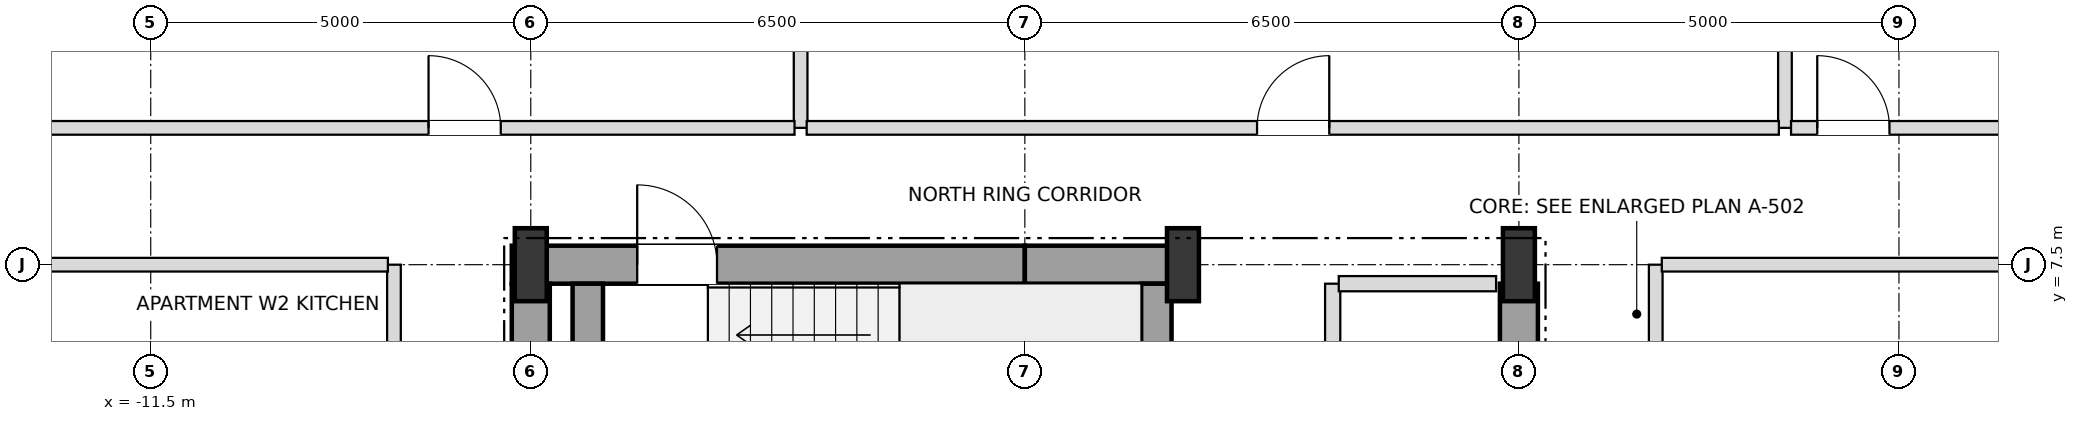
"""IFC4 building model, lengths in metres.
Left out: names, types, materials, properties, quantities, classifications, styles, units other than length and angle.
Written with IfcOpenShell. Run it as: python <this file> out.ifc"""

import sys

from ifc_helpers import new_model, si_unit, direction, frame, frame_2d, origin, origin_2d, place, context, subcontext, project, spatial, rectangle, i_section, extrude, element, fill, save


model = new_model("IFC4")
c1 = context("Model", 3, precision=1e-05, world=origin(), true_north=direction((0.0, 1.0)))
c2 = subcontext(c1, "Body", "Model", "MODEL_VIEW")
j1 = project(units=[si_unit("LENGTHUNIT", "METRE"), si_unit("PLANEANGLEUNIT", "RADIAN")], contexts=[c1])
p1 = place(None, origin())
s1 = spatial("IfcSite", under=j1, at=p1, CompositionType="ELEMENT")
p2 = place(p1, origin())
s2 = spatial("IfcBuilding", under=s1, at=p2, CompositionType="ELEMENT")
p3 = place(p2, frame((0.0, 0.0, 50.4)))
s3 = spatial("IfcBuildingStorey", under=s2, at=p3, CompositionType="ELEMENT", Elevation=50.4)
for number, where, z_axis, x_axis in (
    (1, (-6.5, 7.5, 0.0), (0.0, 0.0, 1.0), (1.0, 0.0, 0.0)),
    (2, (2.08, 7.5, 0.0), (0.0, 0.0, 1.0), (1.0, 0.0, 0.0)),
    (3, (6.5, 7.5, 0.0), (0.0, 0.0, 1.0), (1.0, 0.0, 0.0)),
):
    element("IfcColumn", number, at=place(p3, frame(where, z_axis=z_axis, x_axis=x_axis)), inside=s3, PredefinedType="COLUMN", context=c2, shape_type="SweptSolid", body=[
        extrude(i_section(OverallWidth=0.42, OverallDepth=0.96, WebThickness=0.022, FlangeThickness=0.034, at=origin_2d()), origin(), (0.0, 0.0, 1.0), 3.6),
    ])
p4 = place(p3, frame((-6.75, 7.5, 0.0), z_axis=(0.0, 0.0, 1.0), x_axis=(1.0, 0.0, 0.0)))
e4 = element("IfcWall", 4, at=p4, inside=s3, PredefinedType="SHEAR", context=c2, shape_type="SweptSolid", body=[
    extrude(rectangle(XDim=6.75, YDim=0.5, at=frame_2d((3.375, 0.0))), origin(), (0.0, 0.0, 1.0), 3.38),
])
p5 = place(p4, frame((1.65, 0.0, 0.0)))
e5 = element("IfcOpeningElement", 5, at=p5, cuts=e4, PredefinedType="OPENING", context=c2, shape_type="SweptSolid", body=[
    extrude(rectangle(XDim=1.05, YDim=2.15, at=frame_2d((0.525, 1.075))), frame((0.0, 0.26, 0.0), z_axis=(0.0, -1.0, 0.0), x_axis=(1.0, 0.0, 0.0)), (0.0, 0.0, 1.0), 0.52),
])
p6 = place(p3, frame((0.0, 7.5, 0.0), z_axis=(0.0, 0.0, 1.0), x_axis=(1.0, 0.0, 0.0)))
e6 = element("IfcWall", 6, at=p6, inside=s3, PredefinedType="SHEAR", context=c2, shape_type="SweptSolid", body=[
    extrude(rectangle(XDim=2.08, YDim=0.5, at=frame_2d((1.04, 0.0))), origin(), (0.0, 0.0, 1.0), 3.38),
])
for number, where, z_axis, x_axis in (
    (7, (-6.5, 3.95, 0.0), (0.0, 0.0, 1.0), (0.0, 1.0, 0.0)),
    (8, (6.5, 3.95, 0.0), (0.0, 0.0, 1.0), (0.0, 1.0, 0.0)),
):
    element("IfcWall", number, at=place(p3, frame(where, z_axis=z_axis, x_axis=x_axis)), inside=s3, PredefinedType="SHEAR", context=c2, shape_type="SweptSolid", body=[
        extrude(rectangle(XDim=3.3, YDim=0.5, at=frame_2d((1.65, 0.0))), origin(), (0.0, 0.0, 1.0), 3.38),
    ])
for number, where, z_axis, x_axis in (
    (9, (1.73, 3.95, 0.0), (0.0, 0.0, 1.0), (0.0, 1.0, 0.0)),
    (10, (-5.75, 3.95, 0.0), (0.0, 0.0, 1.0), (0.0, 1.0, 0.0)),
):
    element("IfcWall", number, at=place(p3, frame(where, z_axis=z_axis, x_axis=x_axis)), inside=s3, PredefinedType="SHEAR", context=c2, shape_type="SweptSolid", body=[
        extrude(rectangle(XDim=3.3, YDim=0.4, at=frame_2d((1.65, 0.0))), origin(), (0.0, 0.0, 1.0), 3.38),
    ])
p7 = place(p3, frame((-8.3, -7.5, 0.0), z_axis=(0.0, 0.0, 1.0), x_axis=(0.0, 1.0, 0.0)))
e11 = element("IfcWall", 11, at=p7, inside=s3, PredefinedType="PARTITIONING", context=c2, shape_type="SweptSolid", body=[
    extrude(rectangle(XDim=15.0, YDim=0.18, at=frame_2d((7.5, 0.0))), origin(), (0.0, 0.0, 1.0), 3.38),
])
p8 = place(p7, frame((3.565, 0.0, 0.0)))
e12 = element("IfcOpeningElement", 12, at=p8, cuts=e11, PredefinedType="OPENING", context=c2, shape_type="SweptSolid", body=[
    extrude(rectangle(XDim=0.95, YDim=2.15, at=frame_2d((0.475, 1.075))), frame((0.0, 0.1, 0.0), z_axis=(0.0, -1.0, 0.0), x_axis=(1.0, 0.0, 0.0)), (0.0, 0.0, 1.0), 0.2),
])
p9 = place(p7, frame((11.145, 0.0, 0.0)))
e13 = element("IfcOpeningElement", 13, at=p9, cuts=e11, PredefinedType="OPENING", context=c2, shape_type="SweptSolid", body=[
    extrude(rectangle(XDim=0.95, YDim=2.15, at=frame_2d((0.475, 1.075))), frame((0.0, 0.1, 0.0), z_axis=(0.0, -1.0, 0.0), x_axis=(1.0, 0.0, 0.0)), (0.0, 0.0, 1.0), 0.2),
])
p10 = place(p3, frame((-2.95, 9.3, 0.0), z_axis=(0.0, 0.0, 1.0), x_axis=(0.0, 1.0, 0.0)))
e14 = element("IfcWall", 14, at=p10, inside=s3, PredefinedType="PARTITIONING", context=c2, shape_type="SweptSolid", body=[
    extrude(rectangle(XDim=15.6, YDim=0.18, at=frame_2d((7.8, 0.0))), origin(), (0.0, 0.0, 1.0), 2.816),
])
p11 = place(p3, frame((4.05, 4.2, 0.0), z_axis=(0.0, 0.0, 1.0), x_axis=(0.0, 1.0, 0.0)))
e15 = element("IfcWall", 15, at=p11, inside=s3, PredefinedType="SOLIDWALL", context=c2, shape_type="SweptSolid", body=[
    extrude(rectangle(XDim=3.05, YDim=0.2, at=frame_2d((1.525, 0.0))), origin(), (0.0, 0.0, 1.0), 3.38),
])
p12 = place(p11, frame((0.975, 0.0, 0.0)))
e16 = element("IfcOpeningElement", 16, at=p12, cuts=e15, PredefinedType="OPENING", context=c2, shape_type="SweptSolid", body=[
    extrude(rectangle(XDim=0.95, YDim=2.15, at=frame_2d((0.475, 1.075))), frame((0.0, 0.11, 0.0), z_axis=(0.0, -1.0, 0.0), x_axis=(1.0, 0.0, 0.0)), (0.0, 0.0, 1.0), 0.22),
])
p13 = place(p3, frame((8.3, -7.5, 0.0), z_axis=(0.0, 0.0, 1.0), x_axis=(0.0, 1.0, 0.0)))
e17 = element("IfcWall", 17, at=p13, inside=s3, PredefinedType="PARTITIONING", context=c2, shape_type="SweptSolid", body=[
    extrude(rectangle(XDim=15.0, YDim=0.18, at=frame_2d((7.5, 0.0))), origin(), (0.0, 0.0, 1.0), 3.38),
])
p14 = place(p13, frame((3.475, 0.0, 0.0)))
e18 = element("IfcOpeningElement", 18, at=p14, cuts=e17, PredefinedType="OPENING", context=c2, shape_type="SweptSolid", body=[
    extrude(rectangle(XDim=0.95, YDim=2.15, at=frame_2d((0.475, 1.075))), frame((0.0, 0.1, 0.0), z_axis=(0.0, -1.0, 0.0), x_axis=(1.0, 0.0, 0.0)), (0.0, 0.0, 1.0), 0.2),
])
p15 = place(p3, frame((10.0, 9.3, 0.0), z_axis=(0.0, 0.0, 1.0), x_axis=(0.0, 1.0, 0.0)))
e19 = element("IfcWall", 19, at=p15, inside=s3, PredefinedType="PARTITIONING", context=c2, shape_type="SweptSolid", body=[
    extrude(rectangle(XDim=15.6, YDim=0.18, at=frame_2d((7.8, 0.0))), origin(), (0.0, 0.0, 1.0), 2.816),
])
p16 = place(p15, frame((8.635, 0.0, 0.0)))
e20 = element("IfcOpeningElement", 20, at=p16, cuts=e19, PredefinedType="OPENING", context=c2, shape_type="SweptSolid", body=[
    extrude(rectangle(XDim=0.95, YDim=2.15, at=frame_2d((0.475, 1.075))), frame((0.0, 0.1, 0.0), z_axis=(0.0, -1.0, 0.0), x_axis=(1.0, 0.0, 0.0)), (0.0, 0.0, 1.0), 0.2),
])
p17 = place(p3, frame((4.13, 7.25, 0.0), z_axis=(0.0, 0.0, 1.0), x_axis=(1.0, 0.0, 0.0)))
e21 = element("IfcWall", 21, at=p17, inside=s3, PredefinedType="SOLIDWALL", context=c2, shape_type="SweptSolid", body=[
    extrude(rectangle(XDim=2.07, YDim=0.2, at=frame_2d((1.035, 0.0))), origin(), (0.0, 0.0, 1.0), 3.38),
])
for number, where, z_axis, x_axis in (
    (22, (-16.02, 7.5, 0.0), (0.0, 0.0, 1.0), (1.0, 0.0, 0.0)),
    (23, (8.38, 7.5, 0.0), (0.0, 0.0, 1.0), (1.0, 0.0, 0.0)),
):
    element("IfcWall", number, at=place(p3, frame(where, z_axis=z_axis, x_axis=x_axis)), inside=s3, PredefinedType="PARTITIONING", context=c2, shape_type="SweptSolid", body=[
        extrude(rectangle(XDim=7.64, YDim=0.18, at=frame_2d((3.82, 0.0))), origin(), (0.0, 0.0, 1.0), 2.816),
    ])
p18 = place(p3, frame((-18.4, 9.3, 0.0), z_axis=(0.0, 0.0, 1.0), x_axis=(1.0, 0.0, 0.0)))
e24 = element("IfcWall", 24, at=p18, inside=s3, PredefinedType="PARTITIONING", context=c2, shape_type="SweptSolid", body=[
    extrude(rectangle(XDim=15.37, YDim=0.18, at=frame_2d((7.685, 0.0))), origin(), (0.0, 0.0, 1.0), 2.816),
])
p19 = place(p18, frame((10.555, 0.0, 0.0)))
e25 = element("IfcOpeningElement", 25, at=p19, cuts=e24, PredefinedType="OPENING", context=c2, shape_type="SweptSolid", body=[
    extrude(rectangle(XDim=0.95, YDim=2.15, at=frame_2d((0.475, 1.075))), frame((0.0, 0.1, 0.0), z_axis=(0.0, -1.0, 0.0), x_axis=(1.0, 0.0, 0.0)), (0.0, 0.0, 1.0), 0.2),
])
p20 = place(p3, frame((-2.87, 9.3, 0.0), z_axis=(0.0, 0.0, 1.0), x_axis=(1.0, 0.0, 0.0)))
e26 = element("IfcWall", 26, at=p20, inside=s3, PredefinedType="PARTITIONING", context=c2, shape_type="SweptSolid", body=[
    extrude(rectangle(XDim=12.79, YDim=0.18, at=frame_2d((6.395, 0.0))), origin(), (0.0, 0.0, 1.0), 2.816),
])
p21 = place(p20, frame((5.925, 0.0, 0.0)))
e27 = element("IfcOpeningElement", 27, at=p21, cuts=e26, PredefinedType="OPENING", context=c2, shape_type="SweptSolid", body=[
    extrude(rectangle(XDim=0.95, YDim=2.15, at=frame_2d((0.475, 1.075))), frame((0.0, 0.1, 0.0), z_axis=(0.0, -1.0, 0.0), x_axis=(1.0, 0.0, 0.0)), (0.0, 0.0, 1.0), 0.2),
])
p22 = place(p3, frame((10.08, 9.3, 0.0), z_axis=(0.0, 0.0, 1.0), x_axis=(1.0, 0.0, 0.0)))
e28 = element("IfcWall", 28, at=p22, inside=s3, PredefinedType="PARTITIONING", context=c2, shape_type="SweptSolid", body=[
    extrude(rectangle(XDim=8.24, YDim=0.18, at=frame_2d((4.12, 0.0))), origin(), (0.0, 0.0, 1.0), 2.816),
])
p23 = place(p22, frame((0.345, 0.0, 0.0)))
e29 = element("IfcOpeningElement", 29, at=p23, cuts=e28, PredefinedType="OPENING", context=c2, shape_type="SweptSolid", body=[
    extrude(rectangle(XDim=0.95, YDim=2.15, at=frame_2d((0.475, 1.075))), frame((0.0, 0.1, 0.0), z_axis=(0.0, -1.0, 0.0), x_axis=(1.0, 0.0, 0.0)), (0.0, 0.0, 1.0), 0.2),
])
p24 = place(p5, origin())
e30 = element("IfcDoor", 30, at=p24, inside=s3, OperationType="SINGLE_SWING_LEFT", PredefinedType="DOOR", context=c2, shape_type="SweptSolid", body=[
    extrude(rectangle(XDim=1.05, YDim=2.15, at=frame_2d((0.525, 1.075))), frame((0.0, 0.025, 0.0), z_axis=(0.0, -1.0, 0.0), x_axis=(1.0, 0.0, 0.0)), (0.0, 0.0, 1.0), 0.05),
])
fill(e5, e30)
p25 = place(p23, origin())
e31 = element("IfcDoor", 31, at=p25, inside=s3, OperationType="SINGLE_SWING_LEFT", PredefinedType="DOOR", context=c2, shape_type="SweptSolid", body=[
    extrude(rectangle(XDim=0.95, YDim=2.15, at=frame_2d((0.475, 1.075))), frame((0.0, 0.025, 0.0), z_axis=(0.0, -1.0, 0.0), x_axis=(1.0, 0.0, 0.0)), (0.0, 0.0, 1.0), 0.05),
])
fill(e29, e31)
p26 = place(p19, origin())
e32 = element("IfcDoor", 32, at=p26, inside=s3, OperationType="SINGLE_SWING_LEFT", PredefinedType="DOOR", context=c2, shape_type="SweptSolid", body=[
    extrude(rectangle(XDim=0.95, YDim=2.15, at=frame_2d((0.475, 1.075))), frame((0.0, 0.025, 0.0), z_axis=(0.0, -1.0, 0.0), x_axis=(1.0, 0.0, 0.0)), (0.0, 0.0, 1.0), 0.05),
])
fill(e25, e32)
p27 = place(p21, origin())
e33 = element("IfcDoor", 33, at=p27, inside=s3, OperationType="SINGLE_SWING_RIGHT", PredefinedType="DOOR", context=c2, shape_type="SweptSolid", body=[
    extrude(rectangle(XDim=0.95, YDim=2.15, at=frame_2d((0.475, 1.075))), frame((0.0, 0.025, 0.0), z_axis=(0.0, -1.0, 0.0), x_axis=(1.0, 0.0, 0.0)), (0.0, 0.0, 1.0), 0.05),
])
fill(e27, e33)
save(model, sys.argv[1])
